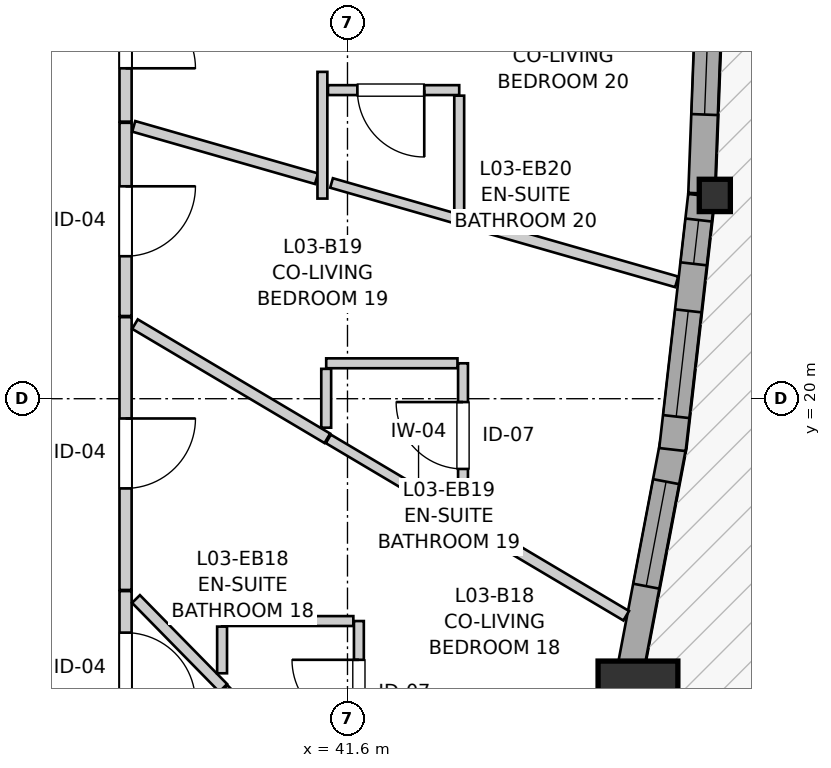
"""IFC4 building model, lengths in metres.
Left out: names, types, materials, properties, quantities, classifications, styles, units other than length and angle.
Written with IfcOpenShell. Run it as: python <this file> out.ifc"""

import sys

from ifc_helpers import new_model, si_unit, direction, frame, frame_2d, origin, origin_2d, place, context, subcontext, project, spatial, rectangle, i_section, extrude, source, transform, mapped, element, fill, save


model = new_model("IFC4")
c1 = context("Model", 3, precision=1e-05, world=origin(), true_north=direction((0.0, 1.0)))
c2 = subcontext(c1, "Body", "Model", "MODEL_VIEW")
j1 = project(units=[si_unit("LENGTHUNIT", "METRE"), si_unit("PLANEANGLEUNIT", "RADIAN")], contexts=[c1])
p1 = place(None, origin())
s1 = spatial("IfcSite", under=j1, at=p1, CompositionType="ELEMENT")
p2 = place(p1, origin())
s2 = spatial("IfcBuilding", under=s1, at=p2, CompositionType="ELEMENT")
p3 = place(p2, frame((0.0, 0.0, 14.2)))
s3 = spatial("IfcBuildingStorey", under=s2, at=p3, CompositionType="ELEMENT", Elevation=14.2)
m1 = source(origin(), c2, "Body", "SweptSolid", [
    extrude(rectangle(XDim=1.05, YDim=1.05, at=origin_2d()), origin(), (0.0, 0.0, 1.0), 2.94),
])
p4 = place(p3, frame((45.422, 16.023, 0.0), z_axis=(0.0, 0.0, 1.0), x_axis=(1.0, 0.0, 0.0)))
e1 = element("IfcColumn", 1, at=p4, inside=s3, PredefinedType="COLUMN", context=c2, shape_type="MappedRepresentation", body=[
    mapped(m1, transform((0.0, 0.0, 0.0), x_axis=(1.0, 0.0, 0.0), y_axis=(0.0, 1.0, 0.0), z_axis=(0.0, 0.0, 1.0), scale=1.0)),
])
m2 = source(origin(), c2, "Body", "SweptSolid", [
    extrude(i_section(OverallWidth=0.409, OverallDepth=0.425, WebThickness=0.03, FlangeThickness=0.048, FilletRadius=0.015, at=origin_2d()), origin(), (0.0, 0.0, 1.0), 2.94),
])
p5 = place(p3, frame((46.433, 22.675, 0.0), z_axis=(0.0, 0.0, 1.0), x_axis=(1.0, 0.0, 0.0)))
e2 = element("IfcColumn", 2, at=p5, inside=s3, PredefinedType="PILASTER", context=c2, shape_type="MappedRepresentation", body=[
    mapped(m2, transform((0.0, 0.0, 0.0), x_axis=(1.0, 0.0, 0.0), y_axis=(0.0, 1.0, 0.0), z_axis=(0.0, 0.0, 1.0), scale=1.0)),
])
p6 = place(p3, frame((45.306, 16.351, 0.0), z_axis=(0.0, 0.0, 1.0), x_axis=(0.186681017514, 0.982420580861, 0.0)))
e3 = element("IfcWall", 3, at=p6, inside=s3, PredefinedType="SOLIDWALL", context=c2, shape_type="SweptSolid", body=[
    extrude(rectangle(XDim=3.123, YDim=0.35, at=frame_2d((1.562, 0.0))), origin(), (0.0, 0.0, 1.0), 2.42),
])
p7 = place(p6, frame((1.204, 0.0, 0.82)))
e4 = element("IfcOpeningElement", 4, at=p7, cuts=e3, PredefinedType="OPENING", context=c2, shape_type="SweptSolid", body=[
    extrude(rectangle(XDim=1.4, YDim=1.35, at=frame_2d((0.7, 0.675))), frame((0.0, 0.185, 0.0), z_axis=(0.0, -1.0, 0.0), x_axis=(1.0, 0.0, 0.0)), (0.0, 0.0, 1.0), 0.37),
])
p8 = place(p3, frame((45.875, 19.331, 0.0), z_axis=(0.0, 0.0, 1.0), x_axis=(0.113329685842, 0.99355743785, 0.0)))
e5 = element("IfcWall", 5, at=p8, inside=s3, PredefinedType="SOLIDWALL", context=c2, shape_type="SweptSolid", body=[
    extrude(rectangle(XDim=3.365, YDim=0.35, at=frame_2d((1.683, 0.0))), origin(), (0.0, 0.0, 1.0), 2.42),
])
p9 = place(p8, frame((0.437, 0.0, 0.82)))
e6 = element("IfcOpeningElement", 6, at=p9, cuts=e5, PredefinedType="OPENING", context=c2, shape_type="SweptSolid", body=[
    extrude(rectangle(XDim=1.4, YDim=1.35, at=frame_2d((0.7, 0.675))), frame((0.0, 0.185, 0.0), z_axis=(0.0, -1.0, 0.0), x_axis=(1.0, 0.0, 0.0)), (0.0, 0.0, 1.0), 0.37),
])
p10 = place(p8, frame((2.459, 0.0, 0.82)))
e7 = element("IfcOpeningElement", 7, at=p10, cuts=e5, PredefinedType="OPENING", context=c2, shape_type="SweptSolid", body=[
    extrude(rectangle(XDim=0.58, YDim=1.35, at=frame_2d((0.29, 0.675))), frame((0.0, 0.185, 0.0), z_axis=(0.0, -1.0, 0.0), x_axis=(1.0, 0.0, 0.0)), (0.0, 0.0, 1.0), 0.37),
])
p11 = place(p3, frame((46.259, 22.701, 0.0), z_axis=(0.0, 0.0, 1.0), x_axis=(0.038015581842, 0.99927714651, 0.0)))
e8 = element("IfcWall", 8, at=p11, inside=s3, PredefinedType="SOLIDWALL", context=c2, shape_type="SweptSolid", body=[
    extrude(rectangle(XDim=3.346, YDim=0.35, at=frame_2d((1.673, 0.0))), origin(), (0.0, 0.0, 1.0), 2.42),
])
p12 = place(p11, frame((1.038, 0.0, 0.82)))
e9 = element("IfcOpeningElement", 9, at=p12, cuts=e8, PredefinedType="OPENING", context=c2, shape_type="SweptSolid", body=[
    extrude(rectangle(XDim=1.25, YDim=1.35, at=frame_2d((0.625, 0.675))), frame((0.0, 0.185, 0.0), z_axis=(0.0, -1.0, 0.0), x_axis=(1.0, 0.0, 0.0)), (0.0, 0.0, 1.0), 0.37),
])
p13 = place(p3, frame((38.68, 21.073, 0.0), z_axis=(0.0, 0.0, 1.0), x_axis=(0.0, -1.0, 0.0)))
e10 = element("IfcWall", 10, at=p13, inside=s3, PredefinedType="PARTITIONING", context=c2, shape_type="SweptSolid", body=[
    extrude(rectangle(XDim=3.589, YDim=0.16, at=frame_2d((1.794, 0.0))), origin(), (0.0, 0.0, 1.0), 2.94),
])
p14 = place(p13, frame((1.333, 0.0, 0.0)))
e11 = element("IfcOpeningElement", 11, at=p14, cuts=e10, PredefinedType="OPENING", context=c2, shape_type="SweptSolid", body=[
    extrude(rectangle(XDim=0.92, YDim=2.1, at=frame_2d((0.46, 1.05))), frame((0.0, 0.09, 0.0), z_axis=(0.0, -1.0, 0.0), x_axis=(1.0, 0.0, 0.0)), (0.0, 0.0, 1.0), 0.18),
])
p15 = place(p3, frame((38.68, 23.63, 0.0), z_axis=(0.0, 0.0, 1.0), x_axis=(0.0, -1.0, 0.0)))
e12 = element("IfcWall", 12, at=p15, inside=s3, PredefinedType="PARTITIONING", context=c2, shape_type="SweptSolid", body=[
    extrude(rectangle(XDim=2.542, YDim=0.16, at=frame_2d((1.271, 0.0))), origin(), (0.0, 0.0, 1.0), 2.94),
])
p16 = place(p15, frame((0.835, 0.0, 0.0)))
e13 = element("IfcOpeningElement", 13, at=p16, cuts=e12, PredefinedType="OPENING", context=c2, shape_type="SweptSolid", body=[
    extrude(rectangle(XDim=0.92, YDim=2.1, at=frame_2d((0.46, 1.05))), frame((0.0, 0.09, 0.0), z_axis=(0.0, -1.0, 0.0), x_axis=(1.0, 0.0, 0.0)), (0.0, 0.0, 1.0), 0.18),
])
p17 = place(p3, frame((38.68, 26.015, 0.0), z_axis=(0.0, 0.0, 1.0), x_axis=(0.0, -1.0, 0.0)))
e14 = element("IfcWall", 14, at=p17, inside=s3, PredefinedType="PARTITIONING", context=c2, shape_type="SweptSolid", body=[
    extrude(rectangle(XDim=2.37, YDim=0.16, at=frame_2d((1.185, 0.0))), origin(), (0.0, 0.0, 1.0), 2.94),
])
p18 = place(p17, frame((0.748, 0.0, 0.0)))
e15 = element("IfcOpeningElement", 15, at=p18, cuts=e14, PredefinedType="OPENING", context=c2, shape_type="SweptSolid", body=[
    extrude(rectangle(XDim=0.92, YDim=2.1, at=frame_2d((0.46, 1.05))), frame((0.0, 0.09, 0.0), z_axis=(0.0, -1.0, 0.0), x_axis=(1.0, 0.0, 0.0)), (0.0, 0.0, 1.0), 0.18),
])
p19 = place(p3, frame((38.68, 17.469, 0.0), z_axis=(0.0, 0.0, 1.0), x_axis=(0.0, -1.0, 0.0)))
e16 = element("IfcWall", 16, at=p19, inside=s3, PredefinedType="PARTITIONING", context=c2, shape_type="SweptSolid", body=[
    extrude(rectangle(XDim=2.049, YDim=0.16, at=frame_2d((1.024, 0.0))), origin(), (0.0, 0.0, 1.0), 2.94),
])
p20 = place(p19, frame((0.546, 0.0, 0.0)))
e17 = element("IfcOpeningElement", 17, at=p20, cuts=e16, PredefinedType="OPENING", context=c2, shape_type="SweptSolid", body=[
    extrude(rectangle(XDim=0.92, YDim=2.1, at=frame_2d((0.46, 1.05))), frame((0.0, 0.09, 0.0), z_axis=(0.0, -1.0, 0.0), x_axis=(1.0, 0.0, 0.0)), (0.0, 0.0, 1.0), 0.18),
])
p21 = place(p3, frame((43.12, 18.566, 0.0), z_axis=(0.0, 0.0, 1.0), x_axis=(0.0, 1.0, 0.0)))
e18 = element("IfcWall", 18, at=p21, inside=s3, PredefinedType="PARTITIONING", context=c2, shape_type="SweptSolid", body=[
    extrude(rectangle(XDim=1.9, YDim=0.13, at=frame_2d((0.95, 0.0))), origin(), (0.0, 0.0, 1.0), 2.94),
])
p22 = place(p21, frame((0.51, 0.0, 0.0)))
e19 = element("IfcOpeningElement", 19, at=p22, cuts=e18, PredefinedType="OPENING", context=c2, shape_type="SweptSolid", body=[
    extrude(rectangle(XDim=0.88, YDim=2.05, at=frame_2d((0.44, 1.025))), frame((0.0, 0.075, 0.0), z_axis=(0.0, -1.0, 0.0), x_axis=(1.0, 0.0, 0.0)), (0.0, 0.0, 1.0), 0.15),
])
p23 = place(p3, frame((41.75, 15.175, 0.0), z_axis=(0.0, 0.0, 1.0), x_axis=(0.0, 1.0, 0.0)))
e20 = element("IfcWall", 20, at=p23, inside=s3, PredefinedType="PARTITIONING", context=c2, shape_type="SweptSolid", body=[
    extrude(rectangle(XDim=1.9, YDim=0.13, at=frame_2d((0.95, 0.0))), origin(), (0.0, 0.0, 1.0), 2.94),
])
p24 = place(p23, frame((0.51, 0.0, 0.0)))
e21 = element("IfcOpeningElement", 21, at=p24, cuts=e20, PredefinedType="OPENING", context=c2, shape_type="SweptSolid", body=[
    extrude(rectangle(XDim=0.88, YDim=2.05, at=frame_2d((0.44, 1.025))), frame((0.0, 0.075, 0.0), z_axis=(0.0, -1.0, 0.0), x_axis=(1.0, 0.0, 0.0)), (0.0, 0.0, 1.0), 0.15),
])
p25 = place(p3, frame((43.07, 24.06, 0.0), z_axis=(0.0, 0.0, 1.0), x_axis=(-1.0, 0.0, 0.0)))
e22 = element("IfcWall", 22, at=p25, inside=s3, PredefinedType="PARTITIONING", context=c2, shape_type="SweptSolid", body=[
    extrude(rectangle(XDim=1.727, YDim=0.13, at=frame_2d((0.864, 0.0))), origin(), (0.0, 0.0, 1.0), 2.94),
])
p26 = place(p25, frame((0.46, 0.0, 0.0)))
e23 = element("IfcOpeningElement", 23, at=p26, cuts=e22, PredefinedType="OPENING", context=c2, shape_type="SweptSolid", body=[
    extrude(rectangle(XDim=0.88, YDim=2.05, at=frame_2d((0.44, 1.025))), frame((0.0, 0.075, 0.0), z_axis=(0.0, -1.0, 0.0), x_axis=(1.0, 0.0, 0.0)), (0.0, 0.0, 1.0), 0.15),
])
p27 = place(p3, frame((38.804, 20.981, 0.0), z_axis=(0.0, 0.0, 1.0), x_axis=(0.859905944731, -0.510452511225, 0.0)))
e24 = element("IfcWall", 24, at=p27, inside=s3, PredefinedType="PARTITIONING", context=c2, shape_type="SweptSolid", body=[
    extrude(rectangle(XDim=2.943, YDim=0.145, at=frame_2d((1.472, 0.0))), origin(), (0.0, 0.0, 1.0), 2.94),
])
p28 = place(p3, frame((43.055, 22.361, 0.0), z_axis=(0.0, 0.0, 1.0), x_axis=(0.961351316588, -0.275324619486, 0.0)))
e25 = element("IfcWall", 25, at=p28, inside=s3, PredefinedType="PARTITIONING", context=c2, shape_type="SweptSolid", body=[
    extrude(rectangle(XDim=2.992, YDim=0.145, at=frame_2d((1.496, 0.0))), origin(), (0.0, 0.0, 1.0), 2.94),
])
p29 = place(p3, frame((42.848, 18.581, 0.0), z_axis=(0.0, 0.0, 1.0), x_axis=(0.859872599939, -0.510508679528, 0.0)))
e26 = element("IfcWall", 26, at=p29, inside=s3, PredefinedType="PARTITIONING", context=c2, shape_type="SweptSolid", body=[
    extrude(rectangle(XDim=2.813, YDim=0.145, at=frame_2d((1.407, 0.0))), origin(), (0.0, 0.0, 1.0), 2.94),
])
p30 = place(p3, frame((38.788, 23.583, 0.0), z_axis=(0.0, 0.0, 1.0), x_axis=(0.961350656565, -0.275326924078, 0.0)))
e27 = element("IfcWall", 27, at=p30, inside=s3, PredefinedType="PARTITIONING", context=c2, shape_type="SweptSolid", body=[
    extrude(rectangle(XDim=2.501, YDim=0.145, at=frame_2d((1.251, 0.0))), origin(), (0.0, 0.0, 1.0), 2.94),
])
p31 = place(p3, frame((38.817, 17.365, 0.0), z_axis=(0.0, 0.0, 1.0), x_axis=(0.70029627305, -0.713852316626, 0.0)))
e28 = element("IfcWall", 28, at=p31, inside=s3, PredefinedType="PARTITIONING", context=c2, shape_type="SweptSolid", body=[
    extrude(rectangle(XDim=1.639, YDim=0.145, at=frame_2d((0.819, 0.0))), origin(), (0.0, 0.0, 1.0), 2.94),
])
p32 = place(p3, frame((41.39, 22.838, 0.0), z_axis=(0.0, 0.0, 1.0), x_axis=(0.961362810051, -0.275284484582, 0.0)))
e29 = element("IfcWall", 29, at=p32, inside=s3, PredefinedType="PARTITIONING", context=c2, shape_type="SweptSolid", body=[
    extrude(rectangle(XDim=1.717, YDim=0.13, at=frame_2d((0.858, 0.0))), origin(), (0.0, 0.0, 1.0), 2.94),
])
for number, where, z_axis, x_axis in (
    (30, (39.95, 17.075, 0.0), (0.0, 0.0, 1.0), (1.0, 0.0, 0.0)),
    (31, (41.32, 20.466, 0.0), (0.0, 0.0, 1.0), (1.0, 0.0, 0.0)),
):
    element("IfcWall", number, at=place(p3, frame(where, z_axis=z_axis, x_axis=x_axis)), inside=s3, PredefinedType="PARTITIONING", context=c2, shape_type="SweptSolid", body=[
        extrude(rectangle(XDim=1.727, YDim=0.13, at=frame_2d((0.864, 0.0))), origin(), (0.0, 0.0, 1.0), 2.94),
    ])
p33 = place(p3, frame((41.348, 19.471, 0.0), z_axis=(0.0, 0.0, 1.0), x_axis=(0.859825694404, -0.510587676352, 0.0)))
e32 = element("IfcWall", 32, at=p33, inside=s3, PredefinedType="PARTITIONING", context=c2, shape_type="SweptSolid", body=[
    extrude(rectangle(XDim=1.729, YDim=0.13, at=frame_2d((0.865, 0.0))), origin(), (0.0, 0.0, 1.0), 2.94),
])
p34 = place(p3, frame((43.07, 22.459, 0.0), z_axis=(0.0, 0.0, 1.0), x_axis=(0.0, 1.0, 0.0)))
e33 = element("IfcWall", 33, at=p34, inside=s3, PredefinedType="PARTITIONING", context=c2, shape_type="SweptSolid", body=[
    extrude(rectangle(XDim=1.528, YDim=0.13, at=frame_2d((0.764, 0.0))), origin(), (0.0, 0.0, 1.0), 2.508),
])
p35 = place(p3, frame((39.975, 16.184, 0.0), z_axis=(0.0, 0.0, 1.0), x_axis=(0.700338966049, -0.713810431861, 0.0)))
e34 = element("IfcWall", 34, at=p35, inside=s3, PredefinedType="PARTITIONING", context=c2, shape_type="SweptSolid", body=[
    extrude(rectangle(XDim=1.377, YDim=0.13, at=frame_2d((0.689, 0.0))), origin(), (0.0, 0.0, 1.0), 2.94),
])
p36 = place(p3, frame((41.27, 22.633, 0.0), z_axis=(0.0, 0.0, 1.0), x_axis=(0.0, 1.0, 0.0)))
e35 = element("IfcWall", 35, at=p36, inside=s3, PredefinedType="PARTITIONING", context=c2, shape_type="SweptSolid", body=[
    extrude(rectangle(XDim=1.667, YDim=0.13, at=frame_2d((0.833, 0.0))), origin(), (0.0, 0.0, 1.0), 2.94),
])
p37 = place(p3, frame((41.32, 19.619, 0.0), z_axis=(0.0, 0.0, 1.0), x_axis=(0.0, 1.0, 0.0)))
e36 = element("IfcWall", 36, at=p37, inside=s3, PredefinedType="PARTITIONING", context=c2, shape_type="SweptSolid", body=[
    extrude(rectangle(XDim=0.774, YDim=0.13, at=frame_2d((0.387, 0.0))), origin(), (0.0, 0.0, 1.0), 2.94),
])
p38 = place(p3, frame((39.95, 16.388, 0.0), z_axis=(0.0, 0.0, 1.0), x_axis=(0.0, 1.0, 0.0)))
e37 = element("IfcWall", 37, at=p38, inside=s3, PredefinedType="PARTITIONING", context=c2, shape_type="SweptSolid", body=[
    extrude(rectangle(XDim=0.614, YDim=0.13, at=frame_2d((0.307, 0.0))), origin(), (0.0, 0.0, 1.0), 2.94),
])
m3 = source(origin(), c2, "Body", "SweptSolid", [
    extrude(rectangle(XDim=1.4, YDim=1.35, at=frame_2d((0.7, 0.675))), frame((0.0, 0.03, 0.0), z_axis=(0.0, -1.0, 0.0), x_axis=(1.0, 0.0, 0.0)), (0.0, 0.0, 1.0), 0.06),
])
p39 = place(p7, origin())
e38 = element("IfcWindow", 38, at=p39, inside=s3, PartitioningType="SINGLE_PANEL", PredefinedType="WINDOW", context=c2, shape_type="MappedRepresentation", body=[
    mapped(m3, transform((0.0, 0.0, 0.0), x_axis=(1.0, 0.0, 0.0), y_axis=(0.0, 1.0, 0.0), z_axis=(0.0, 0.0, 1.0), scale=1.0)),
])
fill(e4, e38)
p40 = place(p9, origin())
e39 = element("IfcWindow", 39, at=p40, inside=s3, PartitioningType="SINGLE_PANEL", PredefinedType="WINDOW", context=c2, shape_type="MappedRepresentation", body=[
    mapped(m3, transform((0.0, 0.0, 0.0), x_axis=(1.0, 0.0, 0.0), y_axis=(0.0, 1.0, 0.0), z_axis=(0.0, 0.0, 1.0), scale=1.0)),
])
fill(e6, e39)
m4 = source(origin(), c2, "Body", "SweptSolid", [
    extrude(rectangle(XDim=0.58, YDim=1.35, at=frame_2d((0.29, 0.675))), frame((0.0, 0.03, 0.0), z_axis=(0.0, -1.0, 0.0), x_axis=(1.0, 0.0, 0.0)), (0.0, 0.0, 1.0), 0.06),
])
p41 = place(p10, origin())
e40 = element("IfcWindow", 40, at=p41, inside=s3, PartitioningType="SINGLE_PANEL", PredefinedType="WINDOW", context=c2, shape_type="MappedRepresentation", body=[
    mapped(m4, transform((0.0, 0.0, 0.0), x_axis=(1.0, 0.0, 0.0), y_axis=(0.0, 1.0, 0.0), z_axis=(0.0, 0.0, 1.0), scale=1.0)),
])
fill(e7, e40)
m5 = source(origin(), c2, "Body", "SweptSolid", [
    extrude(rectangle(XDim=1.25, YDim=1.35, at=frame_2d((0.625, 0.675))), frame((0.0, 0.03, 0.0), z_axis=(0.0, -1.0, 0.0), x_axis=(1.0, 0.0, 0.0)), (0.0, 0.0, 1.0), 0.06),
])
p42 = place(p12, origin())
e41 = element("IfcWindow", 41, at=p42, inside=s3, PartitioningType="SINGLE_PANEL", PredefinedType="WINDOW", context=c2, shape_type="MappedRepresentation", body=[
    mapped(m5, transform((0.0, 0.0, 0.0), x_axis=(1.0, 0.0, 0.0), y_axis=(0.0, 1.0, 0.0), z_axis=(0.0, 0.0, 1.0), scale=1.0)),
])
fill(e9, e41)
m6 = source(origin(), c2, "Body", "SweptSolid", [
    extrude(rectangle(XDim=0.92, YDim=2.1, at=frame_2d((0.46, 1.05))), frame((0.0, 0.025, 0.0), z_axis=(0.0, -1.0, 0.0), x_axis=(1.0, 0.0, 0.0)), (0.0, 0.0, 1.0), 0.05),
])
p43 = place(p14, origin())
e42 = element("IfcDoor", 42, at=p43, inside=s3, OperationType="SINGLE_SWING_LEFT", PredefinedType="DOOR", context=c2, shape_type="MappedRepresentation", body=[
    mapped(m6, transform((0.0, 0.0, 0.0), x_axis=(1.0, 0.0, 0.0), y_axis=(0.0, 1.0, 0.0), z_axis=(0.0, 0.0, 1.0), scale=1.0)),
])
fill(e11, e42)
p44 = place(p16, origin())
e43 = element("IfcDoor", 43, at=p44, inside=s3, OperationType="SINGLE_SWING_LEFT", PredefinedType="DOOR", context=c2, shape_type="MappedRepresentation", body=[
    mapped(m6, transform((0.0, 0.0, 0.0), x_axis=(1.0, 0.0, 0.0), y_axis=(0.0, 1.0, 0.0), z_axis=(0.0, 0.0, 1.0), scale=1.0)),
])
fill(e13, e43)
p45 = place(p18, origin())
e44 = element("IfcDoor", 44, at=p45, inside=s3, OperationType="SINGLE_SWING_RIGHT", PredefinedType="DOOR", context=c2, shape_type="MappedRepresentation", body=[
    mapped(m6, transform((0.0, 0.0, 0.0), x_axis=(1.0, 0.0, 0.0), y_axis=(0.0, 1.0, 0.0), z_axis=(0.0, 0.0, 1.0), scale=1.0)),
])
fill(e15, e44)
p46 = place(p20, origin())
e45 = element("IfcDoor", 45, at=p46, inside=s3, OperationType="SINGLE_SWING_RIGHT", PredefinedType="DOOR", context=c2, shape_type="MappedRepresentation", body=[
    mapped(m6, transform((0.0, 0.0, 0.0), x_axis=(1.0, 0.0, 0.0), y_axis=(0.0, 1.0, 0.0), z_axis=(0.0, 0.0, 1.0), scale=1.0)),
])
fill(e17, e45)
m7 = source(origin(), c2, "Body", "SweptSolid", [
    extrude(rectangle(XDim=0.88, YDim=2.05, at=frame_2d((0.44, 1.025))), frame((0.0, 0.025, 0.0), z_axis=(0.0, -1.0, 0.0), x_axis=(1.0, 0.0, 0.0)), (0.0, 0.0, 1.0), 0.05),
])
p47 = place(p22, origin())
e46 = element("IfcDoor", 46, at=p47, inside=s3, OperationType="SINGLE_SWING_RIGHT", PredefinedType="DOOR", context=c2, shape_type="MappedRepresentation", body=[
    mapped(m7, transform((0.0, 0.0, 0.0), x_axis=(1.0, 0.0, 0.0), y_axis=(0.0, 1.0, 0.0), z_axis=(0.0, 0.0, 1.0), scale=1.0)),
])
fill(e19, e46)
p48 = place(p24, origin())
e47 = element("IfcDoor", 47, at=p48, inside=s3, OperationType="SINGLE_SWING_RIGHT", PredefinedType="DOOR", context=c2, shape_type="MappedRepresentation", body=[
    mapped(m7, transform((0.0, 0.0, 0.0), x_axis=(1.0, 0.0, 0.0), y_axis=(0.0, 1.0, 0.0), z_axis=(0.0, 0.0, 1.0), scale=1.0)),
])
fill(e21, e47)
p49 = place(p26, origin())
e48 = element("IfcDoor", 48, at=p49, inside=s3, OperationType="SINGLE_SWING_LEFT", PredefinedType="DOOR", context=c2, shape_type="MappedRepresentation", body=[
    mapped(m7, transform((0.0, 0.0, 0.0), x_axis=(1.0, 0.0, 0.0), y_axis=(0.0, 1.0, 0.0), z_axis=(0.0, 0.0, 1.0), scale=1.0)),
])
fill(e23, e48)
save(model, sys.argv[1])
